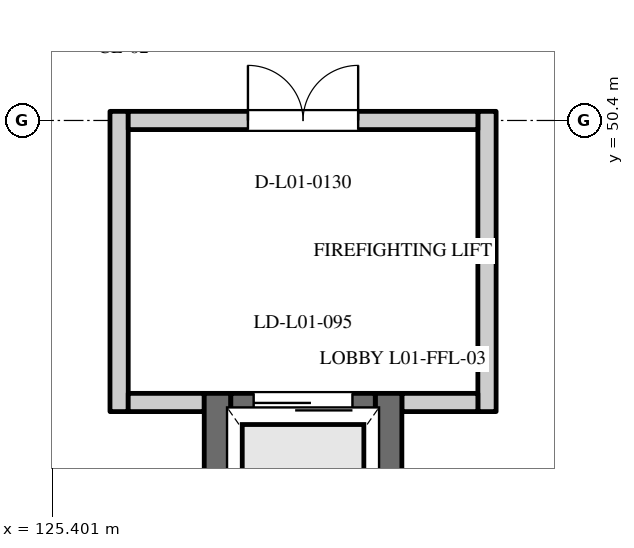
"""IFC4 building model, lengths in metres.
Left out: names, types, materials, properties, quantities, classifications, styles, units other than length and angle.
Written with IfcOpenShell. Run it as: python <this file> out.ifc"""

import sys

from ifc_helpers import new_model, si_unit, direction, frame, frame_2d, origin, place, context, subcontext, project, spatial, rectangle, extrude, element, fill, save


model = new_model("IFC4")
c1 = context("Model", 3, precision=1e-05, world=origin(), true_north=direction((0.0, 1.0)))
c2 = subcontext(c1, "Body", "Model", "MODEL_VIEW")
j1 = project(units=[si_unit("LENGTHUNIT", "METRE"), si_unit("PLANEANGLEUNIT", "RADIAN")], contexts=[c1])
p1 = place(None, origin())
s1 = spatial("IfcSite", under=j1, at=p1, CompositionType="ELEMENT")
p2 = place(p1, origin())
s2 = spatial("IfcBuilding", under=s1, at=p2, CompositionType="ELEMENT")
p3 = place(p2, frame((0.0, 0.0, 4.8)))
s3 = spatial("IfcBuildingStorey", under=s2, at=p3, CompositionType="ELEMENT", Elevation=4.8)
for number, where, z_axis, x_axis in (
    (1, (127.575, 43.06, 0.0), (0.0, 0.0, 1.0), (0.0, 1.0, 0.0)),
    (2, (129.825, 43.06, 0.0), (0.0, 0.0, 1.0), (0.0, 1.0, 0.0)),
):
    element("IfcWall", number, at=place(p3, frame(where, z_axis=z_axis, x_axis=x_axis)), inside=s3, PredefinedType="SHEAR", context=c2, shape_type="SweptSolid", body=[
        extrude(rectangle(XDim=3.75, YDim=0.35, at=frame_2d((1.875, 0.0))), origin(), (0.0, 0.0, 1.0), 4.8),
    ])
p4 = place(p3, frame((127.75, 46.635, 0.0), z_axis=(0.0, 0.0, 1.0), x_axis=(1.0, 0.0, 0.0)))
e3 = element("IfcWall", 3, at=p4, inside=s3, PredefinedType="SHEAR", context=c2, shape_type="SweptSolid", body=[
    extrude(rectangle(XDim=1.9, YDim=0.35, at=frame_2d((0.95, 0.0))), origin(), (0.0, 0.0, 1.0), 4.45),
])
p5 = place(p4, frame((0.3, 0.0, 0.0)))
e4 = element("IfcOpeningElement", 4, at=p5, cuts=e3, PredefinedType="OPENING", context=c2, shape_type="SweptSolid", body=[
    extrude(rectangle(XDim=1.3, YDim=2.2, at=frame_2d((0.65, 1.1))), frame((0.0, 0.187, 0.0), z_axis=(0.0, -1.0, 0.0), x_axis=(1.0, 0.0, 0.0)), (0.0, 0.0, 1.0), 0.374),
])
for number, where, z_axis, x_axis in (
    (5, (126.28, 46.57, 0.0), (0.0, 0.0, 1.0), (0.0, 1.0, 0.0)),
    (6, (131.12, 46.57, 0.0), (0.0, 0.0, 1.0), (0.0, 1.0, 0.0)),
):
    element("IfcWall", number, at=place(p3, frame(where, z_axis=z_axis, x_axis=x_axis)), inside=s3, PredefinedType="STANDARD", context=c2, shape_type="SweptSolid", body=[
        extrude(rectangle(XDim=3.95, YDim=0.24, at=frame_2d((1.975, 0.0))), origin(), (0.0, 0.0, 1.0), 3.7),
    ])
for number, where, z_axis, x_axis in (
    (7, (126.4, 46.69, 0.0), (0.0, 0.0, 1.0), (1.0, 0.0, 0.0)),
    (8, (130.0, 46.69, 0.0), (0.0, 0.0, 1.0), (1.0, 0.0, 0.0)),
):
    element("IfcWall", number, at=place(p3, frame(where, z_axis=z_axis, x_axis=x_axis)), inside=s3, PredefinedType="STANDARD", context=c2, shape_type="SweptSolid", body=[
        extrude(rectangle(XDim=1.0, YDim=0.24, at=frame_2d((0.5, 0.0))), origin(), (0.0, 0.0, 1.0), 3.7),
    ])
p6 = place(p3, frame((126.4, 50.4, 0.0), z_axis=(0.0, 0.0, 1.0), x_axis=(1.0, 0.0, 0.0)))
e9 = element("IfcWall", 9, at=p6, inside=s3, PredefinedType="STANDARD", context=c2, shape_type="SweptSolid", body=[
    extrude(rectangle(XDim=4.6, YDim=0.24, at=frame_2d((2.3, 0.0))), origin(), (0.0, 0.0, 1.0), 3.7),
])
p7 = place(p6, frame((1.575, 0.0, 0.0)))
e10 = element("IfcOpeningElement", 10, at=p7, cuts=e9, PredefinedType="OPENING", context=c2, shape_type="SweptSolid", body=[
    extrude(rectangle(XDim=1.45, YDim=2.2, at=frame_2d((0.725, 1.1))), frame((0.0, 0.132, 0.0), z_axis=(0.0, -1.0, 0.0), x_axis=(1.0, 0.0, 0.0)), (0.0, 0.0, 1.0), 0.264),
])
p8 = place(p5, origin())
e11 = element("IfcDoor", 11, at=p8, inside=s3, OperationType="SLIDING_TO_LEFT", PredefinedType="DOOR", context=c2, shape_type="SweptSolid", body=[
    extrude(rectangle(XDim=1.3, YDim=2.2, at=frame_2d((0.65, 1.1))), frame((0.0, 0.025, 0.0), z_axis=(0.0, -1.0, 0.0), x_axis=(1.0, 0.0, 0.0)), (0.0, 0.0, 1.0), 0.05),
])
fill(e4, e11)
p9 = place(p7, origin())
e12 = element("IfcDoor", 12, at=p9, inside=s3, OperationType="DOUBLE_DOOR_SINGLE_SWING", PredefinedType="DOOR", context=c2, shape_type="SweptSolid", body=[
    extrude(rectangle(XDim=1.45, YDim=2.2, at=frame_2d((0.725, 1.1))), frame((0.0, 0.025, 0.0), z_axis=(0.0, -1.0, 0.0), x_axis=(1.0, 0.0, 0.0)), (0.0, 0.0, 1.0), 0.05),
])
fill(e10, e12)
save(model, sys.argv[1])
